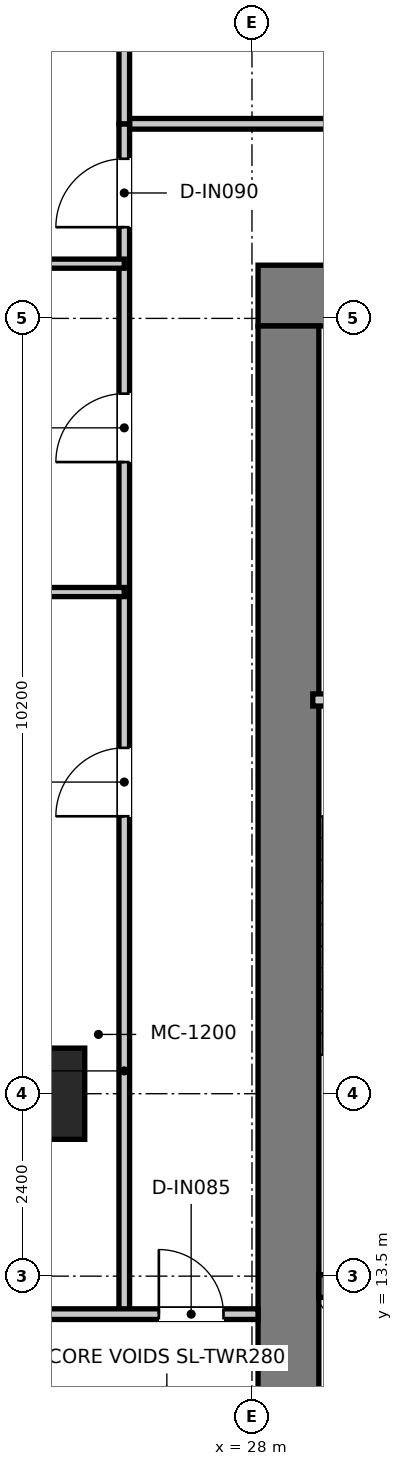
"""IFC4 building model, lengths in metres.
Left out: names, types, materials, properties, quantities, classifications, styles, units other than length and angle.
Written with IfcOpenShell. Run it as: python <this file> out.ifc"""

import sys

from ifc_helpers import new_model, si_unit, direction, frame, frame_2d, origin, origin_2d, place, context, subcontext, project, spatial, rectangle, extrude, source, transform, mapped, element, fill, save


model = new_model("IFC4")
c1 = context("Model", 3, precision=1e-05, world=origin(), true_north=direction((0.0, 1.0)))
c2 = subcontext(c1, "Body", "Model", "MODEL_VIEW")
j1 = project(units=[si_unit("LENGTHUNIT", "METRE"), si_unit("PLANEANGLEUNIT", "RADIAN")], contexts=[c1])
p1 = place(None, origin())
s1 = spatial("IfcSite", under=j1, at=p1, CompositionType="ELEMENT")
p2 = place(p1, origin())
s2 = spatial("IfcBuilding", under=s1, at=p2, CompositionType="ELEMENT")
p3 = place(p2, frame((0.0, 0.0, 359.3)))
s3 = spatial("IfcBuildingStorey", under=s2, at=p3, CompositionType="ELEMENT", Elevation=359.3)
p4 = place(p3, frame((28.08, 26.4, 0.0), z_axis=(0.0, 0.0, 1.0), x_axis=(1.0, 0.0, 0.0)))
e1 = element("IfcWall", 1, at=p4, inside=s3, PredefinedType="SHEAR", context=c2, shape_type="SweptSolid", body=[
    extrude(rectangle(XDim=15.84, YDim=0.8, at=frame_2d((7.92, 0.0))), origin(), (0.0, 0.0, 1.0), 3.95),
])
p5 = place(p4, frame((7.22, 0.0, 0.0)))
e2 = element("IfcOpeningElement", 2, at=p5, cuts=e1, PredefinedType="OPENING", context=c2, shape_type="SweptSolid", body=[
    extrude(rectangle(XDim=1.4, YDim=2.2, at=frame_2d((0.7, 1.1))), frame((0.0, 0.41, 0.0), z_axis=(0.0, -1.0, 0.0), x_axis=(1.0, 0.0, 0.0)), (0.0, 0.0, 1.0), 0.82),
])
p6 = place(p4, frame((1.775, 0.0, 0.0)))
e3 = element("IfcOpeningElement", 3, at=p6, cuts=e1, PredefinedType="OPENING", context=c2, shape_type="SweptSolid", body=[
    extrude(rectangle(XDim=1.05, YDim=2.1, at=frame_2d((0.525, 1.05))), frame((0.0, 0.41, 0.0), z_axis=(0.0, -1.0, 0.0), x_axis=(1.0, 0.0, 0.0)), (0.0, 0.0, 1.0), 0.82),
])
p7 = place(p4, frame((13.015, 0.0, 0.0)))
e4 = element("IfcOpeningElement", 4, at=p7, cuts=e1, PredefinedType="OPENING", context=c2, shape_type="SweptSolid", body=[
    extrude(rectangle(XDim=1.05, YDim=2.1, at=frame_2d((0.525, 1.05))), frame((0.0, 0.41, 0.0), z_axis=(0.0, -1.0, 0.0), x_axis=(1.0, 0.0, 0.0)), (0.0, 0.0, 1.0), 0.82),
])
p8 = place(p3, frame((28.48, 11.3, 0.0), z_axis=(0.0, 0.0, 1.0), x_axis=(0.0, 1.0, 0.0)))
e5 = element("IfcWall", 5, at=p8, inside=s3, PredefinedType="SHEAR", context=c2, shape_type="SweptSolid", body=[
    extrude(rectangle(XDim=14.7, YDim=0.8, at=frame_2d((7.35, 0.0))), origin(), (0.0, 0.0, 1.0), 3.95),
])
p9 = place(p3, frame((28.88, 13.37, 0.0), z_axis=(0.0, 0.0, 1.0), x_axis=(1.0, 0.0, 0.0)))
e6 = element("IfcWall", 6, at=p9, inside=s3, PredefinedType="SHEAR", context=c2, shape_type="SweptSolid", body=[
    extrude(rectangle(XDim=3.1, YDim=0.3, at=frame_2d((1.55, 0.0))), origin(), (0.0, 0.0, 1.0), 3.95),
])
m1 = source(origin(), c2, "Body", "SweptSolid", [
    extrude(rectangle(XDim=1.2, YDim=1.2, at=origin_2d()), origin(), (0.0, 0.0, 1.0), 3.95),
])
p10 = place(p3, frame((25.2, 15.9, 0.0), z_axis=(0.0, 0.0, 1.0), x_axis=(1.0, 0.0, 0.0)))
e7 = element("IfcColumn", 7, at=p10, inside=s3, PredefinedType="USERDEFINED", context=c2, shape_type="MappedRepresentation", body=[
    mapped(m1, transform((0.0, 0.0, 0.0), x_axis=(1.0, 0.0, 0.0), y_axis=(0.0, 1.0, 0.0), z_axis=(0.0, 0.0, 1.0), scale=1.0)),
])
p11 = place(p3, frame((28.8, 21.08, 0.0), z_axis=(0.0, 0.0, 1.0), x_axis=(1.0, 0.0, 0.0)))
e8 = element("IfcWall", 8, at=p11, inside=s3, PredefinedType="PARTITIONING", context=c2, shape_type="SweptSolid", body=[
    extrude(rectangle(XDim=3.16, YDim=0.16, at=frame_2d((1.58, 0.0))), origin(), (0.0, 0.0, 1.0), 3.6),
])
p12 = place(p11, frame((1.055, 0.0, 0.0)))
e9 = element("IfcOpeningElement", 9, at=p12, cuts=e8, PredefinedType="OPENING", context=c2, shape_type="SweptSolid", body=[
    extrude(rectangle(XDim=1.05, YDim=2.1, at=frame_2d((0.525, 1.05))), frame((0.0, 0.09, 0.0), z_axis=(0.0, -1.0, 0.0), x_axis=(1.0, 0.0, 0.0)), (0.0, 0.0, 1.0), 0.18),
])
p13 = place(p3, frame((26.32, 28.66, 0.0), z_axis=(0.0, 0.0, 1.0), x_axis=(1.0, 0.0, 0.0)))
e10 = element("IfcWall", 10, at=p13, inside=s3, PredefinedType="PARTITIONING", context=c2, shape_type="SweptSolid", body=[
    extrude(rectangle(XDim=19.36, YDim=0.14, at=frame_2d((9.68, 0.0))), origin(), (0.0, 0.0, 1.0), 3.11),
])
p14 = place(p13, frame((3.365, 0.0, 0.0)))
e11 = element("IfcOpeningElement", 11, at=p14, cuts=e10, PredefinedType="OPENING", context=c2, shape_type="SweptSolid", body=[
    extrude(rectangle(XDim=0.95, YDim=2.1, at=frame_2d((0.475, 1.05))), frame((0.0, 0.08, 0.0), z_axis=(0.0, -1.0, 0.0), x_axis=(1.0, 0.0, 0.0)), (0.0, 0.0, 1.0), 0.16),
])
p15 = place(p13, frame((13.045, 0.0, 0.0)))
e12 = element("IfcOpeningElement", 12, at=p15, cuts=e10, PredefinedType="OPENING", context=c2, shape_type="SweptSolid", body=[
    extrude(rectangle(XDim=0.95, YDim=2.1, at=frame_2d((0.475, 1.05))), frame((0.0, 0.08, 0.0), z_axis=(0.0, -1.0, 0.0), x_axis=(1.0, 0.0, 0.0)), (0.0, 0.0, 1.0), 0.16),
])
p16 = place(p3, frame((26.32, 13.0, 0.0), z_axis=(0.0, 0.0, 1.0), x_axis=(0.0, 1.0, 0.0)))
e13 = element("IfcWall", 13, at=p16, inside=s3, PredefinedType="PARTITIONING", context=c2, shape_type="SweptSolid", body=[
    extrude(rectangle(XDim=15.66, YDim=0.14, at=frame_2d((7.83, 0.0))), origin(), (0.0, 0.0, 1.0), 3.06),
])
p17 = place(p16, frame((14.3, 0.0, 0.0)))
e14 = element("IfcOpeningElement", 14, at=p17, cuts=e13, PredefinedType="OPENING", context=c2, shape_type="SweptSolid", body=[
    extrude(rectangle(XDim=0.9, YDim=2.1, at=frame_2d((0.45, 1.05))), frame((0.0, 0.08, 0.0), z_axis=(0.0, -1.0, 0.0), x_axis=(1.0, 0.0, 0.0)), (0.0, 0.0, 1.0), 0.16),
])
p18 = place(p16, frame((6.55, 0.0, 0.0)))
e15 = element("IfcOpeningElement", 15, at=p18, cuts=e13, PredefinedType="OPENING", context=c2, shape_type="SweptSolid", body=[
    extrude(rectangle(XDim=0.9, YDim=2.1, at=frame_2d((0.45, 1.05))), frame((0.0, 0.08, 0.0), z_axis=(0.0, -1.0, 0.0), x_axis=(1.0, 0.0, 0.0)), (0.0, 0.0, 1.0), 0.16),
])
p19 = place(p16, frame((11.21, 0.0, 0.0)))
e16 = element("IfcOpeningElement", 16, at=p19, cuts=e13, PredefinedType="OPENING", context=c2, shape_type="SweptSolid", body=[
    extrude(rectangle(XDim=0.9, YDim=2.1, at=frame_2d((0.45, 1.05))), frame((0.0, 0.08, 0.0), z_axis=(0.0, -1.0, 0.0), x_axis=(1.0, 0.0, 0.0)), (0.0, 0.0, 1.0), 0.16),
])
p20 = place(p3, frame((19.842, 13.0, 0.0), z_axis=(0.0, 0.0, 1.0), x_axis=(1.0, 0.0, 0.0)))
e17 = element("IfcWall", 17, at=p20, inside=s3, PredefinedType="PARTITIONING", context=c2, shape_type="SweptSolid", body=[
    extrude(rectangle(XDim=8.238, YDim=0.14, at=frame_2d((4.119, 0.0))), origin(), (0.0, 0.0, 1.0), 3.11),
])
p21 = place(p20, frame((6.933, 0.0, 0.0)))
e18 = element("IfcOpeningElement", 18, at=p21, cuts=e17, PredefinedType="OPENING", context=c2, shape_type="SweptSolid", body=[
    extrude(rectangle(XDim=0.85, YDim=2.1, at=frame_2d((0.425, 1.05))), frame((0.0, 0.08, 0.0), z_axis=(0.0, -1.0, 0.0), x_axis=(1.0, 0.0, 0.0)), (0.0, 0.0, 1.0), 0.16),
])
p22 = place(p3, frame((16.524, 26.82, 0.0), z_axis=(0.0, 0.0, 1.0), x_axis=(1.0, 0.0, 0.0)))
e19 = element("IfcWall", 19, at=p22, inside=s3, PredefinedType="PARTITIONING", context=c2, shape_type="SweptSolid", body=[
    extrude(rectangle(XDim=9.796, YDim=0.12, at=frame_2d((4.898, 0.0))), origin(), (0.0, 0.0, 1.0), 3.06),
])
p23 = place(p3, frame((26.32, 28.66, 0.0), z_axis=(0.0, 0.0, 1.0), x_axis=(0.0, 1.0, 0.0)))
e20 = element("IfcWall", 20, at=p23, inside=s3, PredefinedType="PARTITIONING", context=c2, shape_type="SweptSolid", body=[
    extrude(rectangle(XDim=5.24, YDim=0.14, at=frame_2d((2.62, 0.0))), origin(), (0.0, 0.0, 1.0), 3.36),
])
p24 = place(p3, frame((17.561, 22.5, 0.0), z_axis=(0.0, 0.0, 1.0), x_axis=(1.0, 0.0, 0.0)))
e21 = element("IfcWall", 21, at=p24, inside=s3, PredefinedType="PARTITIONING", context=c2, shape_type="SweptSolid", body=[
    extrude(rectangle(XDim=8.759, YDim=0.12, at=frame_2d((4.379, 0.0))), origin(), (0.0, 0.0, 1.0), 3.06),
])
p25 = place(p17, origin())
e22 = element("IfcDoor", 22, at=p25, inside=s3, OperationType="SINGLE_SWING_LEFT", PredefinedType="DOOR", context=c2, shape_type="SweptSolid", body=[
    extrude(rectangle(XDim=0.9, YDim=2.1, at=frame_2d((0.45, 1.05))), frame((0.0, 0.025, 0.0), z_axis=(0.0, -1.0, 0.0), x_axis=(1.0, 0.0, 0.0)), (0.0, 0.0, 1.0), 0.05),
])
fill(e14, e22)
p26 = place(p18, origin())
e23 = element("IfcDoor", 23, at=p26, inside=s3, OperationType="SINGLE_SWING_LEFT", PredefinedType="DOOR", context=c2, shape_type="SweptSolid", body=[
    extrude(rectangle(XDim=0.9, YDim=2.1, at=frame_2d((0.45, 1.05))), frame((0.0, 0.025, 0.0), z_axis=(0.0, -1.0, 0.0), x_axis=(1.0, 0.0, 0.0)), (0.0, 0.0, 1.0), 0.05),
])
fill(e15, e23)
p27 = place(p19, origin())
e24 = element("IfcDoor", 24, at=p27, inside=s3, OperationType="SINGLE_SWING_LEFT", PredefinedType="DOOR", context=c2, shape_type="SweptSolid", body=[
    extrude(rectangle(XDim=0.9, YDim=2.1, at=frame_2d((0.45, 1.05))), frame((0.0, 0.025, 0.0), z_axis=(0.0, -1.0, 0.0), x_axis=(1.0, 0.0, 0.0)), (0.0, 0.0, 1.0), 0.05),
])
fill(e16, e24)
p28 = place(p21, origin())
e25 = element("IfcDoor", 25, at=p28, inside=s3, OperationType="SINGLE_SWING_LEFT", PredefinedType="DOOR", context=c2, shape_type="SweptSolid", body=[
    extrude(rectangle(XDim=0.85, YDim=2.1, at=frame_2d((0.425, 1.05))), frame((0.0, 0.025, 0.0), z_axis=(0.0, -1.0, 0.0), x_axis=(1.0, 0.0, 0.0)), (0.0, 0.0, 1.0), 0.05),
])
fill(e18, e25)
save(model, sys.argv[1])
